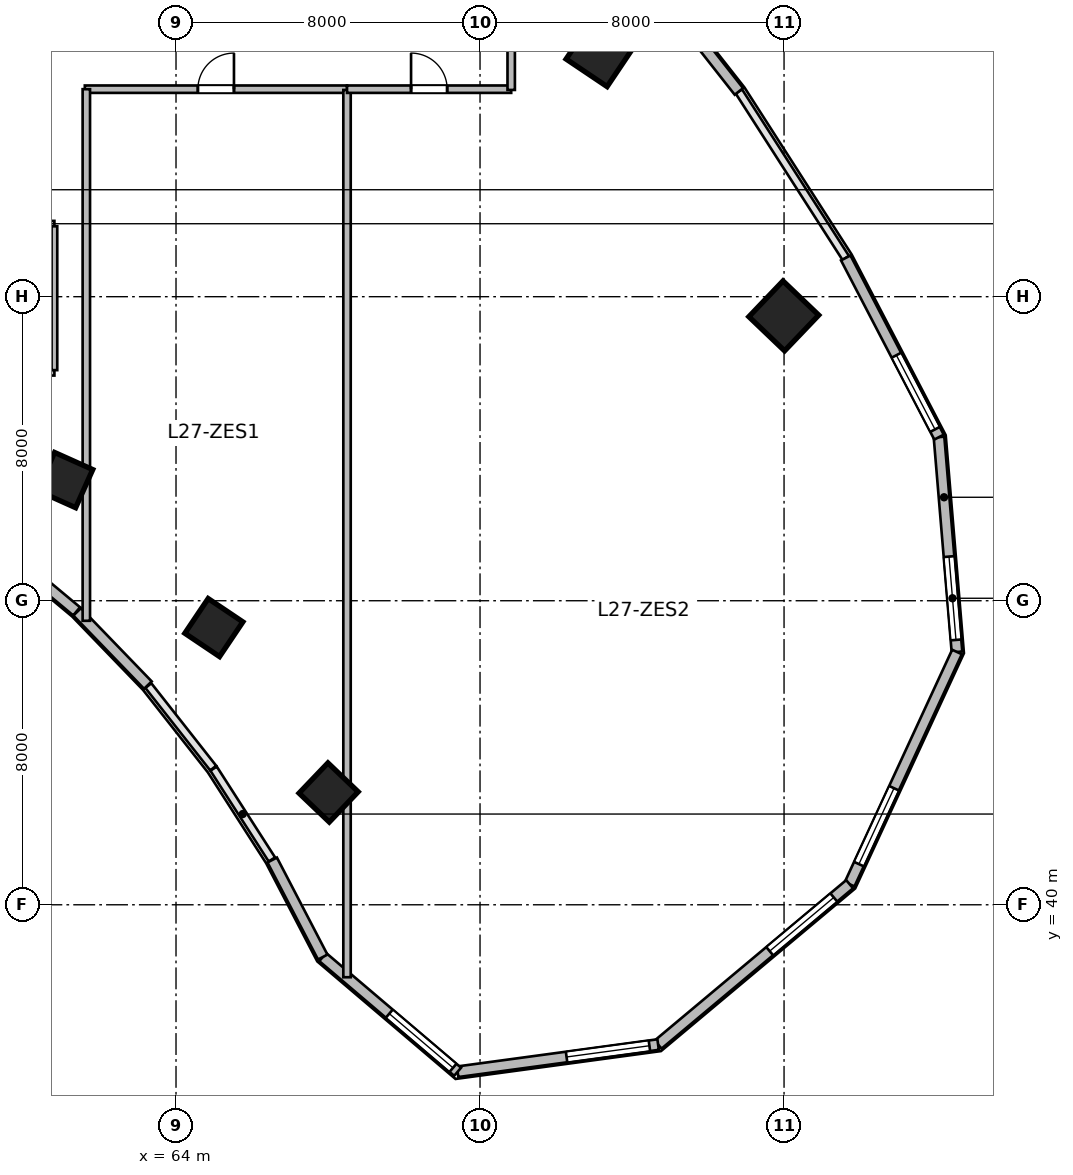
"""IFC4 building model, lengths in metres.
Left out: names, types, materials, properties, quantities, classifications, styles, units other than length and angle.
Written with IfcOpenShell. Run it as: python <this file> out.ifc"""

import sys

from ifc_helpers import new_model, si_unit, direction, frame, frame_2d, origin, origin_2d, place, context, subcontext, project, spatial, rectangle, extrude, source, transform, mapped, element, fill, save


model = new_model("IFC4")
c1 = context("Model", 3, precision=1e-05, world=origin(), true_north=direction((0.0, 1.0)))
c2 = subcontext(c1, "Body", "Model", "MODEL_VIEW")
j1 = project(units=[si_unit("LENGTHUNIT", "METRE"), si_unit("PLANEANGLEUNIT", "RADIAN")], contexts=[c1])
p1 = place(None, origin())
s1 = spatial("IfcSite", under=j1, at=p1, CompositionType="ELEMENT")
p2 = place(p1, origin())
s2 = spatial("IfcBuilding", under=s1, at=p2, CompositionType="ELEMENT")
p3 = place(p2, frame((0.0, 0.0, 115.5)))
s3 = spatial("IfcBuildingStorey", under=s2, at=p3, CompositionType="ELEMENT", Elevation=115.5)
m1 = source(origin(), c2, "Body", "SweptSolid", [
    extrude(rectangle(XDim=1.1, YDim=1.1, at=origin_2d()), origin(), (0.0, 0.0, 1.0), 3.9),
])
for number, where, z_axis, x_axis in (
    (1, (61.082, 51.175, 0.0), (0.0, 0.0, 1.0), (0.409, 0.912, 0.0)),
    (2, (64.996, 47.294, 0.0), (0.0, 0.0, 1.0), (0.558, 0.83, 0.0)),
):
    element("IfcColumn", number, at=place(p3, frame(where, z_axis=z_axis, x_axis=x_axis)), inside=s3, PredefinedType="COLUMN", context=c2, shape_type="MappedRepresentation", body=[
        mapped(m1, transform((0.0, 0.0, 0.0), scale=1.0)),
    ])
m2 = source(origin(), c2, "Body", "SweptSolid", [
    extrude(rectangle(XDim=1.3, YDim=1.3, at=origin_2d()), origin(), (0.0, 0.0, 1.0), 3.9),
])
p4 = place(p3, frame((75.167, 62.43, 0.0), z_axis=(0.0, 0.0, 1.0), x_axis=(0.55774510898, 0.830012285095, 0.0)))
e3 = element("IfcColumn", 3, at=p4, inside=s3, PredefinedType="COLUMN", context=c2, shape_type="MappedRepresentation", body=[
    mapped(m2, transform((0.0, 0.0, 0.0), scale=1.0)),
])
p5 = place(p3, frame((68.015, 42.955, 0.0), z_axis=(0.0, 0.0, 1.0), x_axis=(0.690756218984, 0.723087716626, 0.0)))
e4 = element("IfcColumn", 4, at=p5, inside=s3, PredefinedType="COLUMN", context=c2, shape_type="MappedRepresentation", body=[
    mapped(m1, transform((0.0, 0.0, 0.0), scale=1.0)),
])
p6 = place(p3, frame((79.993, 55.494, 0.0), z_axis=(0.0, 0.0, 1.0), x_axis=(0.690756218984, 0.723087716626, 0.0)))
e5 = element("IfcColumn", 5, at=p6, inside=s3, PredefinedType="COLUMN", context=c2, shape_type="MappedRepresentation", body=[
    mapped(m2, transform((0.0, 0.0, 0.0), scale=1.0)),
])
m3 = source(origin(), c2, "Body", "SweptSolid", [
    extrude(rectangle(XDim=5.674, YDim=0.28, at=frame_2d((2.837, 0.0))), origin(), (0.0, 0.0, 1.0), 3.65),
])
p7 = place(p3, frame((84.078, 52.305, 0.0), z_axis=(0.0, 0.0, 1.0), x_axis=(0.083309007867, -0.996523762491, 0.0)))
e6 = element("IfcWall", 6, at=p7, inside=s3, PredefinedType="SOLIDWALL", context=c2, shape_type="MappedRepresentation", body=[
    mapped(m3, transform((0.0, 0.0, 0.0), scale=1.0)),
])
p8 = place(p7, frame((3.155, 0.0, 0.95)))
e7 = element("IfcOpeningElement", 7, at=p8, cuts=e6, PredefinedType="OPENING", context=c2, shape_type="SweptSolid", body=[
    extrude(rectangle(XDim=2.2, YDim=2.1, at=frame_2d((1.1, 1.05))), frame((0.0, 0.15, 0.0), z_axis=(0.0, -1.0, 0.0), x_axis=(1.0, 0.0, 0.0)), (0.0, 0.0, 1.0), 0.3),
])
m4 = source(origin(), c2, "Body", "SweptSolid", [
    extrude(rectangle(XDim=6.732, YDim=0.28, at=frame_2d((3.366, 0.0))), origin(), (0.0, 0.0, 1.0), 3.65),
])
p9 = place(p3, frame((84.55, 46.652, 0.0), z_axis=(0.0, 0.0, 1.0), x_axis=(-0.419644552709, -0.907688520023, 0.0)))
e8 = element("IfcWall", 8, at=p9, inside=s3, PredefinedType="SOLIDWALL", context=c2, shape_type="MappedRepresentation", body=[
    mapped(m4, transform((0.0, 0.0, 0.0), scale=1.0)),
])
p10 = place(p9, frame((3.949, 0.0, 0.95)))
e9 = element("IfcOpeningElement", 9, at=p10, cuts=e8, PredefinedType="OPENING", context=c2, shape_type="SweptSolid", body=[
    extrude(rectangle(XDim=2.2, YDim=2.1, at=frame_2d((1.1, 1.05))), frame((0.0, 0.15, 0.0), z_axis=(0.0, -1.0, 0.0), x_axis=(1.0, 0.0, 0.0)), (0.0, 0.0, 1.0), 0.3),
])
m5 = source(origin(), c2, "Body", "SweptSolid", [
    extrude(rectangle(XDim=6.573, YDim=0.28, at=frame_2d((3.287, 0.0))), origin(), (0.0, 0.0, 1.0), 3.65),
])
p11 = place(p3, frame((81.725, 40.541, 0.0), z_axis=(0.0, 0.0, 1.0), x_axis=(-0.766715154163, -0.641987439423, 0.0)))
e10 = element("IfcWall", 10, at=p11, inside=s3, PredefinedType="SOLIDWALL", context=c2, shape_type="MappedRepresentation", body=[
    mapped(m5, transform((0.0, 0.0, 0.0), scale=1.0)),
])
p12 = place(p11, frame((0.543, 0.0, 0.95)))
e11 = element("IfcOpeningElement", 11, at=p12, cuts=e10, PredefinedType="OPENING", context=c2, shape_type="SweptSolid", body=[
    extrude(rectangle(XDim=2.2, YDim=2.1, at=frame_2d((1.1, 1.05))), frame((0.0, 0.15, 0.0), z_axis=(0.0, -1.0, 0.0), x_axis=(1.0, 0.0, 0.0)), (0.0, 0.0, 1.0), 0.3),
])
m6 = source(origin(), c2, "Body", "SweptSolid", [
    extrude(rectangle(XDim=5.324, YDim=0.28, at=frame_2d((2.662, 0.0))), origin(), (0.0, 0.0, 1.0), 3.65),
])
p13 = place(p3, frame((76.686, 36.322, 0.0), z_axis=(0.0, 0.0, 1.0), x_axis=(-0.990931467223, -0.134368252451, 0.0)))
e12 = element("IfcWall", 12, at=p13, inside=s3, PredefinedType="SOLIDWALL", context=c2, shape_type="MappedRepresentation", body=[
    mapped(m6, transform((0.0, 0.0, 0.0), scale=1.0)),
])
p14 = place(p13, frame((0.231, 0.0, 0.95)))
e13 = element("IfcOpeningElement", 13, at=p14, cuts=e12, PredefinedType="OPENING", context=c2, shape_type="SweptSolid", body=[
    extrude(rectangle(XDim=2.2, YDim=2.1, at=frame_2d((1.1, 1.05))), frame((0.0, 0.15, 0.0), z_axis=(0.0, -1.0, 0.0), x_axis=(1.0, 0.0, 0.0)), (0.0, 0.0, 1.0), 0.3),
])
m7 = source(origin(), c2, "Body", "SweptSolid", [
    extrude(rectangle(XDim=4.659, YDim=0.28, at=frame_2d((2.33, 0.0))), origin(), (0.0, 0.0, 1.0), 3.65),
])
p15 = place(p3, frame((71.41, 35.606, 0.0), z_axis=(0.0, 0.0, 1.0), x_axis=(-0.761913458795, 0.647678841176, 0.0)))
e14 = element("IfcWall", 14, at=p15, inside=s3, PredefinedType="SOLIDWALL", context=c2, shape_type="MappedRepresentation", body=[
    mapped(m7, transform((0.0, 0.0, 0.0), scale=1.0)),
])
p16 = place(p15, frame((0.16, 0.0, 0.95)))
e15 = element("IfcOpeningElement", 15, at=p16, cuts=e14, PredefinedType="OPENING", context=c2, shape_type="SweptSolid", body=[
    extrude(rectangle(XDim=2.2, YDim=2.1, at=frame_2d((1.1, 1.05))), frame((0.0, 0.15, 0.0), z_axis=(0.0, -1.0, 0.0), x_axis=(1.0, 0.0, 0.0)), (0.0, 0.0, 1.0), 0.3),
])
m8 = source(origin(), c2, "Body", "SweptSolid", [
    extrude(rectangle(XDim=2.88, YDim=0.28, at=frame_2d((1.44, 0.0))), origin(), (0.0, 0.0, 1.0), 3.65),
])
p17 = place(p3, frame((67.861, 38.624, 0.0), z_axis=(0.0, 0.0, 1.0), x_axis=(-0.461769086658, 0.887000175088, 0.0)))
e16 = element("IfcWall", 16, at=p17, inside=s3, PredefinedType="SOLIDWALL", context=c2, shape_type="MappedRepresentation", body=[
    mapped(m8, transform((0.0, 0.0, 0.0), scale=1.0)),
])
m9 = source(origin(), c2, "Body", "SweptSolid", [
    extrude(rectangle(XDim=2.68, YDim=0.28, at=frame_2d((1.34, 0.0))), origin(), (0.0, 0.0, 1.0), 3.65),
])
p18 = place(p3, frame((63.26, 45.78, 0.0), z_axis=(0.0, 0.0, 1.0), x_axis=(-0.694561996568, 0.719432855049, 0.0)))
e17 = element("IfcWall", 17, at=p18, inside=s3, PredefinedType="SOLIDWALL", context=c2, shape_type="MappedRepresentation", body=[
    mapped(m9, transform((0.0, 0.0, 0.0), scale=1.0)),
])
m10 = source(origin(), c2, "Body", "SweptSolid", [
    extrude(rectangle(XDim=2.601, YDim=0.28, at=frame_2d((1.3, 0.0))), origin(), (0.0, 0.0, 1.0), 3.65),
])
p19 = place(p3, frame((61.385, 47.721, 0.0), z_axis=(0.0, 0.0, 1.0), x_axis=(-0.76796730295, 0.640489048775, 0.0)))
e18 = element("IfcWall", 18, at=p19, inside=s3, PredefinedType="SOLIDWALL", context=c2, shape_type="MappedRepresentation", body=[
    mapped(m10, transform((0.0, 0.0, 0.0), scale=1.0)),
])
m11 = source(origin(), c2, "Body", "SweptSolid", [
    extrude(rectangle(XDim=5.058, YDim=0.28, at=frame_2d((2.529, 0.0))), origin(), (0.0, 0.0, 1.0), 3.65),
])
p20 = place(p3, frame((75.685, 65.376, 0.0), z_axis=(0.0, 0.0, 1.0), x_axis=(0.618145507434, -0.786063694391, 0.0)))
e19 = element("IfcWall", 19, at=p20, inside=s3, PredefinedType="SOLIDWALL", context=c2, shape_type="MappedRepresentation", body=[
    mapped(m11, transform((0.0, 0.0, 0.0), scale=1.0)),
])
m12 = source(origin(), c2, "Body", "SweptSolid", [
    extrude(rectangle(XDim=5.315, YDim=0.28, at=frame_2d((2.658, 0.0))), origin(), (0.0, 0.0, 1.0), 3.65),
])
p21 = place(p3, frame((81.623, 57.02, 0.0), z_axis=(0.0, 0.0, 1.0), x_axis=(0.461760527822, -0.887004630735, 0.0)))
e20 = element("IfcWall", 20, at=p21, inside=s3, PredefinedType="SOLIDWALL", context=c2, shape_type="MappedRepresentation", body=[
    mapped(m12, transform((0.0, 0.0, 0.0), scale=1.0)),
])
p22 = place(p21, frame((2.886, 0.0, 0.95)))
e21 = element("IfcOpeningElement", 21, at=p22, cuts=e20, PredefinedType="OPENING", context=c2, shape_type="SweptSolid", body=[
    extrude(rectangle(XDim=2.2, YDim=2.1, at=frame_2d((1.1, 1.05))), frame((0.0, 0.15, 0.0), z_axis=(0.0, -1.0, 0.0), x_axis=(1.0, 0.0, 0.0)), (0.0, 0.0, 1.0), 0.3),
])
m13 = source(origin(), c2, "Body", "SweptSolid", [
    extrude(rectangle(XDim=6.6, YDim=0.15, at=frame_2d((3.3, 0.0))), origin(), (0.0, 0.0, 1.0), 3.095),
])
p23 = place(p3, frame((54.2, 54.0, 0.0), z_axis=(0.0, 0.0, 1.0), x_axis=(1.0, 0.0, 0.0)))
e22 = element("IfcWall", 22, at=p23, inside=s3, PredefinedType="PARTITIONING", context=c2, shape_type="MappedRepresentation", body=[
    mapped(m13, transform((0.0, 0.0, 0.0), scale=1.0)),
])
m14 = source(origin(), c2, "Body", "SweptSolid", [
    extrude(rectangle(XDim=6.6, YDim=0.15, at=frame_2d((3.3, 0.0))), origin(), (0.0, 0.0, 1.0), 3.65),
])
p24 = place(p3, frame((54.2, 57.92, 0.0), z_axis=(0.0, 0.0, 1.0), x_axis=(1.0, 0.0, 0.0)))
e23 = element("IfcWall", 23, at=p24, inside=s3, PredefinedType="PARTITIONING", context=c2, shape_type="MappedRepresentation", body=[
    mapped(m14, transform((0.0, 0.0, 0.0), scale=1.0)),
])
p25 = place(p24, frame((2.825, 0.0, 0.0)))
e24 = element("IfcOpeningElement", 24, at=p25, cuts=e23, PredefinedType="OPENING", context=c2, shape_type="SweptSolid", body=[
    extrude(rectangle(XDim=0.95, YDim=2.1, at=frame_2d((0.475, 1.05))), frame((0.0, 0.085, 0.0), z_axis=(0.0, -1.0, 0.0), x_axis=(1.0, 0.0, 0.0)), (0.0, 0.0, 1.0), 0.17),
])
m15 = source(origin(), c2, "Body", "SweptSolid", [
    extrude(rectangle(XDim=3.785, YDim=0.15, at=frame_2d((1.893, 0.0))), origin(), (0.0, 0.0, 1.0), 3.65),
])
p26 = place(p3, frame((60.8, 54.067, 0.0), z_axis=(0.0, 0.0, 1.0), x_axis=(0.0, 1.0, 0.0)))
e25 = element("IfcWall", 25, at=p26, inside=s3, PredefinedType="PARTITIONING", context=c2, shape_type="MappedRepresentation", body=[
    mapped(m15, transform((0.0, 0.0, 0.0), scale=1.0)),
])
m16 = source(origin(), c2, "Body", "SweptSolid", [
    extrude(rectangle(XDim=6.9, YDim=0.195, at=frame_2d((3.45, 0.0))), origin(), (0.0, 0.0, 1.0), 3.65),
])
p27 = place(p3, frame((61.6, 61.46, 0.0), z_axis=(0.0, 0.0, 1.0), x_axis=(1.0, 0.0, 0.0)))
e26 = element("IfcWall", 26, at=p27, inside=s3, PredefinedType="PARTITIONING", context=c2, shape_type="MappedRepresentation", body=[
    mapped(m16, transform((0.0, 0.0, 0.0), scale=1.0)),
])
p28 = place(p27, frame((2.975, 0.0, 0.0)))
e27 = element("IfcOpeningElement", 27, at=p28, cuts=e26, PredefinedType="OPENING", context=c2, shape_type="SweptSolid", body=[
    extrude(rectangle(XDim=0.95, YDim=2.1, at=frame_2d((0.475, 1.05))), frame((0.0, 0.107, 0.0), z_axis=(0.0, -1.0, 0.0), x_axis=(1.0, 0.0, 0.0)), (0.0, 0.0, 1.0), 0.215),
])
m17 = source(origin(), c2, "Body", "SweptSolid", [
    extrude(rectangle(XDim=23.346, YDim=0.195, at=frame_2d((11.673, 0.0))), origin(), (0.0, 0.0, 1.0), 2.942),
])
p29 = place(p3, frame((68.5, 38.094, 0.0), z_axis=(0.0, 0.0, 1.0), x_axis=(0.0, 1.0, 0.0)))
e28 = element("IfcWall", 28, at=p29, inside=s3, PredefinedType="PARTITIONING", context=c2, shape_type="MappedRepresentation", body=[
    mapped(m17, transform((0.0, 0.0, 0.0), scale=1.0)),
])
m18 = source(origin(), c2, "Body", "SweptSolid", [
    extrude(rectangle(XDim=4.32, YDim=0.195, at=frame_2d((2.16, 0.0))), origin(), (0.0, 0.0, 1.0), 3.65),
])
p30 = place(p3, frame((68.5, 61.46, 0.0), z_axis=(0.0, 0.0, 1.0), x_axis=(1.0, 0.0, 0.0)))
e29 = element("IfcWall", 29, at=p30, inside=s3, PredefinedType="PARTITIONING", context=c2, shape_type="MappedRepresentation", body=[
    mapped(m18, transform((0.0, 0.0, 0.0), scale=1.0)),
])
p31 = place(p30, frame((1.685, 0.0, 0.0)))
e30 = element("IfcOpeningElement", 30, at=p31, cuts=e29, PredefinedType="OPENING", context=c2, shape_type="SweptSolid", body=[
    extrude(rectangle(XDim=0.95, YDim=2.1, at=frame_2d((0.475, 1.05))), frame((0.0, 0.107, 0.0), z_axis=(0.0, -1.0, 0.0), x_axis=(1.0, 0.0, 0.0)), (0.0, 0.0, 1.0), 0.215),
])
m19 = source(origin(), c2, "Body", "SweptSolid", [
    extrude(rectangle(XDim=13.988, YDim=0.195, at=frame_2d((6.994, 0.0))), origin(), (0.0, 0.0, 1.0), 2.942),
])
p32 = place(p3, frame((61.64, 47.472, 0.0), z_axis=(0.0, 0.0, 1.0), x_axis=(0.0, 1.0, 0.0)))
e31 = element("IfcWall", 31, at=p32, inside=s3, PredefinedType="PARTITIONING", context=c2, shape_type="MappedRepresentation", body=[
    mapped(m19, transform((0.0, 0.0, 0.0), scale=1.0)),
])
m20 = source(origin(), c2, "Body", "SweptSolid", [
    extrude(rectangle(XDim=2.62, YDim=0.195, at=frame_2d((1.31, 0.0))), origin(), (0.0, 0.0, 1.0), 3.324),
])
p33 = place(p3, frame((72.82, 61.44, 0.0), z_axis=(0.0, 0.0, 1.0), x_axis=(0.0, 1.0, 0.0)))
e32 = element("IfcWall", 32, at=p33, inside=s3, PredefinedType="PARTITIONING", context=c2, shape_type="MappedRepresentation", body=[
    mapped(m20, transform((0.0, 0.0, 0.0), scale=1.0)),
])
m21 = source(origin(), c2, "Body", "SweptSolid", [
    extrude(rectangle(XDim=2.2, YDim=2.1, at=frame_2d((1.1, 1.05))), frame((0.0, 0.03, 0.0), z_axis=(0.0, -1.0, 0.0), x_axis=(1.0, 0.0, 0.0)), (0.0, 0.0, 1.0), 0.06),
])
p34 = place(p8, origin())
e33 = element("IfcWindow", 33, at=p34, inside=s3, PartitioningType="TRIPLE_PANEL_VERTICAL", PredefinedType="WINDOW", context=c2, shape_type="MappedRepresentation", body=[
    mapped(m21, transform((0.0, 0.0, 0.0), scale=1.0)),
])
fill(e7, e33)
p35 = place(p10, origin())
e34 = element("IfcWindow", 34, at=p35, inside=s3, PartitioningType="TRIPLE_PANEL_VERTICAL", PredefinedType="WINDOW", context=c2, shape_type="MappedRepresentation", body=[
    mapped(m21, transform((0.0, 0.0, 0.0), scale=1.0)),
])
fill(e9, e34)
p36 = place(p12, origin())
e35 = element("IfcWindow", 35, at=p36, inside=s3, PartitioningType="TRIPLE_PANEL_VERTICAL", PredefinedType="WINDOW", context=c2, shape_type="MappedRepresentation", body=[
    mapped(m21, transform((0.0, 0.0, 0.0), scale=1.0)),
])
fill(e11, e35)
p37 = place(p14, origin())
e36 = element("IfcWindow", 36, at=p37, inside=s3, PartitioningType="TRIPLE_PANEL_VERTICAL", PredefinedType="WINDOW", context=c2, shape_type="MappedRepresentation", body=[
    mapped(m21, transform((0.0, 0.0, 0.0), scale=1.0)),
])
fill(e13, e36)
p38 = place(p16, origin())
e37 = element("IfcWindow", 37, at=p38, inside=s3, PartitioningType="TRIPLE_PANEL_VERTICAL", PredefinedType="WINDOW", context=c2, shape_type="MappedRepresentation", body=[
    mapped(m21, transform((0.0, 0.0, 0.0), scale=1.0)),
])
fill(e15, e37)
p39 = place(p22, origin())
e38 = element("IfcWindow", 38, at=p39, inside=s3, PartitioningType="TRIPLE_PANEL_VERTICAL", PredefinedType="WINDOW", context=c2, shape_type="MappedRepresentation", body=[
    mapped(m21, transform((0.0, 0.0, 0.0), scale=1.0)),
])
fill(e21, e38)
m22 = source(origin(), c2, "Body", "SweptSolid", [
    extrude(rectangle(XDim=0.95, YDim=2.1, at=frame_2d((0.475, 1.05))), frame((0.0, 0.025, 0.0), z_axis=(0.0, -1.0, 0.0), x_axis=(1.0, 0.0, 0.0)), (0.0, 0.0, 1.0), 0.05),
])
p40 = place(p28, origin())
e39 = element("IfcDoor", 39, at=p40, inside=s3, OperationType="SINGLE_SWING_RIGHT", PredefinedType="DOOR", context=c2, shape_type="MappedRepresentation", body=[
    mapped(m22, transform((0.0, 0.0, 0.0), scale=1.0)),
])
fill(e27, e39)
p41 = place(p31, origin())
e40 = element("IfcDoor", 40, at=p41, inside=s3, OperationType="SINGLE_SWING_LEFT", PredefinedType="DOOR", context=c2, shape_type="MappedRepresentation", body=[
    mapped(m22, transform((0.0, 0.0, 0.0), scale=1.0)),
])
fill(e30, e40)
save(model, sys.argv[1])
